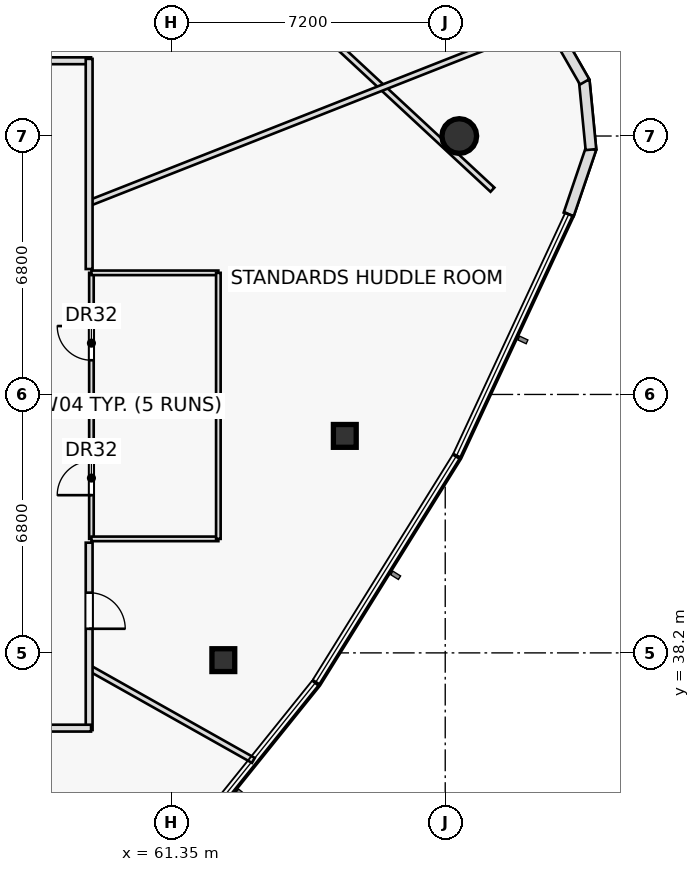
"""IFC4 building model, lengths in metres.
Left out: names, types, materials, properties, quantities, classifications, styles, units other than length and angle.
Written with IfcOpenShell. Run it as: python <this file> out.ifc"""

import sys

from ifc_helpers import new_model, si_unit, direction, frame, frame_2d, origin, origin_2d, place, context, subcontext, project, spatial, rectangle, hollow_rectangle, hollow_circle, extrude, element, fill, save


model = new_model("IFC4")
c1 = context("Model", 3, precision=1e-05, world=origin(), true_north=direction((0.0, 1.0)))
c2 = subcontext(c1, "Body", "Model", "MODEL_VIEW")
j1 = project(units=[si_unit("LENGTHUNIT", "METRE"), si_unit("PLANEANGLEUNIT", "RADIAN")], contexts=[c1])
p1 = place(None, origin())
s1 = spatial("IfcSite", under=j1, at=p1, CompositionType="ELEMENT")
p2 = place(p1, origin())
s2 = spatial("IfcBuilding", under=s1, at=p2, CompositionType="ELEMENT")
p3 = place(p2, frame((0.0, 0.0, 241.9)))
s3 = spatial("IfcBuildingStorey", under=s2, at=p3, CompositionType="ELEMENT", Elevation=241.9)
for number, where, z_axis, x_axis in (
    (1, (62.711, 38.009, 0.0), (0.0, 0.0, 1.0), (1.0, 0.0, 0.0)),
    (2, (65.907, 43.909, 0.0), (0.0, 0.0, 1.0), (1.0, 0.0, 0.0)),
):
    element("IfcColumn", number, at=place(p3, frame(where, z_axis=z_axis, x_axis=x_axis)), inside=s3, PredefinedType="COLUMN", context=c2, shape_type="SweptSolid", body=[
        extrude(hollow_rectangle(XDim=0.6, YDim=0.6, WallThickness=0.036, at=origin_2d()), origin(), (0.0, 0.0, 1.0), 3.65),
    ])
p4 = place(p3, frame((68.92, 51.799, 0.0), z_axis=(0.0, 0.0, 1.0), x_axis=(1.0, 0.0, 0.0)))
e3 = element("IfcColumn", 3, at=p4, inside=s3, PredefinedType="COLUMN", context=c2, shape_type="SweptSolid", body=[
    extrude(hollow_circle(Radius=0.457, WallThickness=0.04, at=origin_2d()), origin(), (0.0, 0.0, 1.0), 3.65),
])
p5 = place(p3, frame((69.792, 50.388, 0.0), z_axis=(0.0, 0.0, 1.0), x_axis=(-0.732769799181, 0.680476613418, 0.0)))
e4 = element("IfcWall", 4, at=p5, inside=s3, PredefinedType="PARTITIONING", context=c2, shape_type="SweptSolid", body=[
    extrude(rectangle(XDim=11.378, YDim=0.15, at=frame_2d((5.689, 0.0))), origin(), (0.0, 0.0, 1.0), 3.025),
])
p6 = place(p3, frame((59.24, 41.2, 0.0), z_axis=(0.0, 0.0, 1.0), x_axis=(0.0, 1.0, 0.0)))
e5 = element("IfcWall", 5, at=p6, inside=s3, PredefinedType="PARTITIONING", context=c2, shape_type="SweptSolid", body=[
    extrude(rectangle(XDim=7.0, YDim=0.12, at=frame_2d((3.5, 0.0))), origin(), (0.0, 0.0, 1.0), 3.65),
])
p7 = place(p6, frame((1.15, 0.0, 0.0)))
e6 = element("IfcOpeningElement", 6, at=p7, cuts=e5, PredefinedType="OPENING", context=c2, shape_type="SweptSolid", body=[
    extrude(rectangle(XDim=0.9, YDim=2.05, at=frame_2d((0.45, 1.025))), frame((0.0, 0.07, 0.0), z_axis=(0.0, -1.0, 0.0), x_axis=(1.0, 0.0, 0.0)), (0.0, 0.0, 1.0), 0.14),
])
p8 = place(p6, frame((4.7, 0.0, 0.0)))
e7 = element("IfcOpeningElement", 7, at=p8, cuts=e5, PredefinedType="OPENING", context=c2, shape_type="SweptSolid", body=[
    extrude(rectangle(XDim=0.9, YDim=2.05, at=frame_2d((0.45, 1.025))), frame((0.0, 0.07, 0.0), z_axis=(0.0, -1.0, 0.0), x_axis=(1.0, 0.0, 0.0)), (0.0, 0.0, 1.0), 0.14),
])
p9 = place(p3, frame((59.24, 41.2, 0.0), z_axis=(0.0, 0.0, 1.0), x_axis=(1.0, 0.0, 0.0)))
e8 = element("IfcWall", 8, at=p9, inside=s3, PredefinedType="PARTITIONING", context=c2, shape_type="SweptSolid", body=[
    extrude(rectangle(XDim=3.34, YDim=0.12, at=frame_2d((1.67, 0.0))), origin(), (0.0, 0.0, 1.0), 3.025),
])
for number, where, z_axis, x_axis in (
    (9, (59.24, 44.65, 0.0), (0.0, 0.0, 1.0), (1.0, 0.0, 0.0)),
    (10, (59.24, 48.2, 0.0), (0.0, 0.0, 1.0), (1.0, 0.0, 0.0)),
):
    element("IfcWall", number, at=place(p3, frame(where, z_axis=z_axis, x_axis=x_axis)), inside=s3, PredefinedType="PARTITIONING", context=c2, shape_type="SweptSolid", body=[
        extrude(rectangle(XDim=3.34, YDim=0.12, at=frame_2d((1.67, 0.0))), origin(), (0.0, 0.0, 1.0), 3.65),
    ])
p10 = place(p3, frame((62.58, 41.2, 0.0), z_axis=(0.0, 0.0, 1.0), x_axis=(0.0, 1.0, 0.0)))
e11 = element("IfcWall", 11, at=p10, inside=s3, PredefinedType="PARTITIONING", context=c2, shape_type="SweptSolid", body=[
    extrude(rectangle(XDim=7.0, YDim=0.12, at=frame_2d((3.5, 0.0))), origin(), (0.0, 0.0, 1.0), 3.325),
])
p11 = place(p3, frame((59.18, 50.034, 0.0), z_axis=(0.0, 0.0, 1.0), x_axis=(0.930423685665, 0.366485695701, 0.0)))
e12 = element("IfcWall", 12, at=p11, inside=s3, PredefinedType="PARTITIONING", context=c2, shape_type="SweptSolid", body=[
    extrude(rectangle(XDim=13.032, YDim=0.15, at=frame_2d((6.516, 0.0))), origin(), (0.0, 0.0, 1.0), 3.025),
])
p12 = place(p3, frame((59.18, 37.804, 0.0), z_axis=(0.0, 0.0, 1.0), x_axis=(0.871373014064, -0.490621106721, 0.0)))
e13 = element("IfcWall", 13, at=p12, inside=s3, PredefinedType="PARTITIONING", context=c2, shape_type="SweptSolid", body=[
    extrude(rectangle(XDim=4.96, YDim=0.15, at=frame_2d((2.48, 0.0))), origin(), (0.0, 0.0, 1.0), 3.135),
])
p13 = place(p3, frame((54.3, 53.78, 0.0), z_axis=(0.0, 0.0, 1.0), x_axis=(1.0, 0.0, 0.0)))
e14 = element("IfcWall", 14, at=p13, inside=s3, PredefinedType="PARTITIONING", context=c2, shape_type="SweptSolid", body=[
    extrude(rectangle(XDim=4.93, YDim=0.18, at=frame_2d((2.465, 0.0))), origin(), (0.0, 0.0, 1.0), 3.65),
])
p14 = place(p13, frame((1.99, 0.0, 0.0)))
e15 = element("IfcOpeningElement", 15, at=p14, cuts=e14, PredefinedType="OPENING", context=c2, shape_type="SweptSolid", body=[
    extrude(rectangle(XDim=0.95, YDim=2.05, at=frame_2d((0.475, 1.025))), frame((0.0, 0.1, 0.0), z_axis=(0.0, -1.0, 0.0), x_axis=(1.0, 0.0, 0.0)), (0.0, 0.0, 1.0), 0.2),
])
p15 = place(p3, frame((59.18, 53.83, 0.0), z_axis=(0.0, 0.0, 1.0), x_axis=(0.0, -1.0, 0.0)))
e16 = element("IfcWall", 16, at=p15, inside=s3, PredefinedType="PARTITIONING", context=c2, shape_type="SweptSolid", body=[
    extrude(rectangle(XDim=5.53, YDim=0.18, at=frame_2d((2.765, 0.0))), origin(), (0.0, 0.0, 1.0), 3.65),
])
p16 = place(p3, frame((59.18, 41.1, 0.0), z_axis=(0.0, 0.0, 1.0), x_axis=(0.0, -1.0, 0.0)))
e17 = element("IfcWall", 17, at=p16, inside=s3, PredefinedType="PARTITIONING", context=c2, shape_type="SweptSolid", body=[
    extrude(rectangle(XDim=4.93, YDim=0.18, at=frame_2d((2.465, 0.0))), origin(), (0.0, 0.0, 1.0), 3.325),
])
p17 = place(p16, frame((1.316, 0.0, 0.0)))
e18 = element("IfcOpeningElement", 18, at=p17, cuts=e17, PredefinedType="OPENING", context=c2, shape_type="SweptSolid", body=[
    extrude(rectangle(XDim=0.95, YDim=2.05, at=frame_2d((0.475, 1.025))), frame((0.0, 0.1, 0.0), z_axis=(0.0, -1.0, 0.0), x_axis=(1.0, 0.0, 0.0)), (0.0, 0.0, 1.0), 0.2),
])
p18 = place(p3, frame((59.23, 36.22, 0.0), z_axis=(0.0, 0.0, 1.0), x_axis=(-1.0, 0.0, 0.0)))
e19 = element("IfcWall", 19, at=p18, inside=s3, PredefinedType="PARTITIONING", context=c2, shape_type="SweptSolid", body=[
    extrude(rectangle(XDim=19.48, YDim=0.18, at=frame_2d((9.74, 0.0))), origin(), (0.0, 0.0, 1.0), 3.025),
])
p19 = place(p18, frame((3.378, 0.0, 0.0)))
e20 = element("IfcOpeningElement", 20, at=p19, cuts=e19, PredefinedType="OPENING", context=c2, shape_type="SweptSolid", body=[
    extrude(rectangle(XDim=0.95, YDim=2.05, at=frame_2d((0.475, 1.025))), frame((0.0, 0.1, 0.0), z_axis=(0.0, -1.0, 0.0), x_axis=(1.0, 0.0, 0.0)), (0.0, 0.0, 1.0), 0.2),
])
p20 = place(p18, frame((8.88, 0.0, 0.0)))
e21 = element("IfcOpeningElement", 21, at=p20, cuts=e19, PredefinedType="OPENING", context=c2, shape_type="SweptSolid", body=[
    extrude(rectangle(XDim=0.95, YDim=2.05, at=frame_2d((0.475, 1.025))), frame((0.0, 0.1, 0.0), z_axis=(0.0, -1.0, 0.0), x_axis=(1.0, 0.0, 0.0)), (0.0, 0.0, 1.0), 0.2),
])
p21 = place(p18, frame((14.756, 0.0, 0.0)))
e22 = element("IfcOpeningElement", 22, at=p21, cuts=e19, PredefinedType="OPENING", context=c2, shape_type="SweptSolid", body=[
    extrude(rectangle(XDim=0.95, YDim=2.05, at=frame_2d((0.475, 1.025))), frame((0.0, 0.1, 0.0), z_axis=(0.0, -1.0, 0.0), x_axis=(1.0, 0.0, 0.0)), (0.0, 0.0, 1.0), 0.2),
])
p22 = place(p3, frame((71.8, 49.74, 0.0), z_axis=(0.0, 0.0, 1.0), x_axis=(0.321388247225, 0.946947514145, 0.0)))
e23 = element("IfcWall", 23, at=p22, inside=s3, PredefinedType="STANDARD", context=c2, shape_type="SweptSolid", body=[
    extrude(rectangle(XDim=1.829, YDim=0.28, at=frame_2d((0.915, 0.0))), origin(), (0.0, 0.0, 1.0), 3.65),
])
p23 = place(p3, frame((72.384, 51.443, 0.0), z_axis=(0.0, 0.0, 1.0), x_axis=(-0.096697603656, 0.995313806519, 0.0)))
e24 = element("IfcWall", 24, at=p23, inside=s3, PredefinedType="STANDARD", context=c2, shape_type="SweptSolid", body=[
    extrude(rectangle(XDim=1.818, YDim=0.28, at=frame_2d((0.909, 0.0))), origin(), (0.0, 0.0, 1.0), 3.65),
])
p24 = place(p3, frame((72.217, 53.224, 0.0), z_axis=(0.0, 0.0, 1.0), x_axis=(-0.497787070382, 0.867299275083, 0.0)))
e25 = element("IfcWall", 25, at=p24, inside=s3, PredefinedType="STANDARD", context=c2, shape_type="SweptSolid", body=[
    extrude(rectangle(XDim=1.818, YDim=0.28, at=frame_2d((0.909, 0.0))), origin(), (0.0, 0.0, 1.0), 3.65),
])
p25 = place(p7, origin())
e26 = element("IfcDoor", 26, at=p25, inside=s3, OperationType="SINGLE_SWING_LEFT", PredefinedType="DOOR", context=c2, shape_type="SweptSolid", body=[
    extrude(rectangle(XDim=0.9, YDim=2.05, at=frame_2d((0.45, 1.025))), frame((0.0, 0.025, 0.0), z_axis=(0.0, -1.0, 0.0), x_axis=(1.0, 0.0, 0.0)), (0.0, 0.0, 1.0), 0.05),
])
fill(e6, e26)
p26 = place(p8, origin())
e27 = element("IfcDoor", 27, at=p26, inside=s3, OperationType="SINGLE_SWING_RIGHT", PredefinedType="DOOR", context=c2, shape_type="SweptSolid", body=[
    extrude(rectangle(XDim=0.9, YDim=2.05, at=frame_2d((0.45, 1.025))), frame((0.0, 0.025, 0.0), z_axis=(0.0, -1.0, 0.0), x_axis=(1.0, 0.0, 0.0)), (0.0, 0.0, 1.0), 0.05),
])
fill(e7, e27)
p27 = place(p17, origin())
e28 = element("IfcDoor", 28, at=p27, inside=s3, OperationType="SINGLE_SWING_RIGHT", PredefinedType="DOOR", context=c2, shape_type="SweptSolid", body=[
    extrude(rectangle(XDim=0.95, YDim=2.05, at=frame_2d((0.475, 1.025))), frame((0.0, 0.025, 0.0), z_axis=(0.0, -1.0, 0.0), x_axis=(1.0, 0.0, 0.0)), (0.0, 0.0, 1.0), 0.05),
])
fill(e18, e28)
save(model, sys.argv[1])
